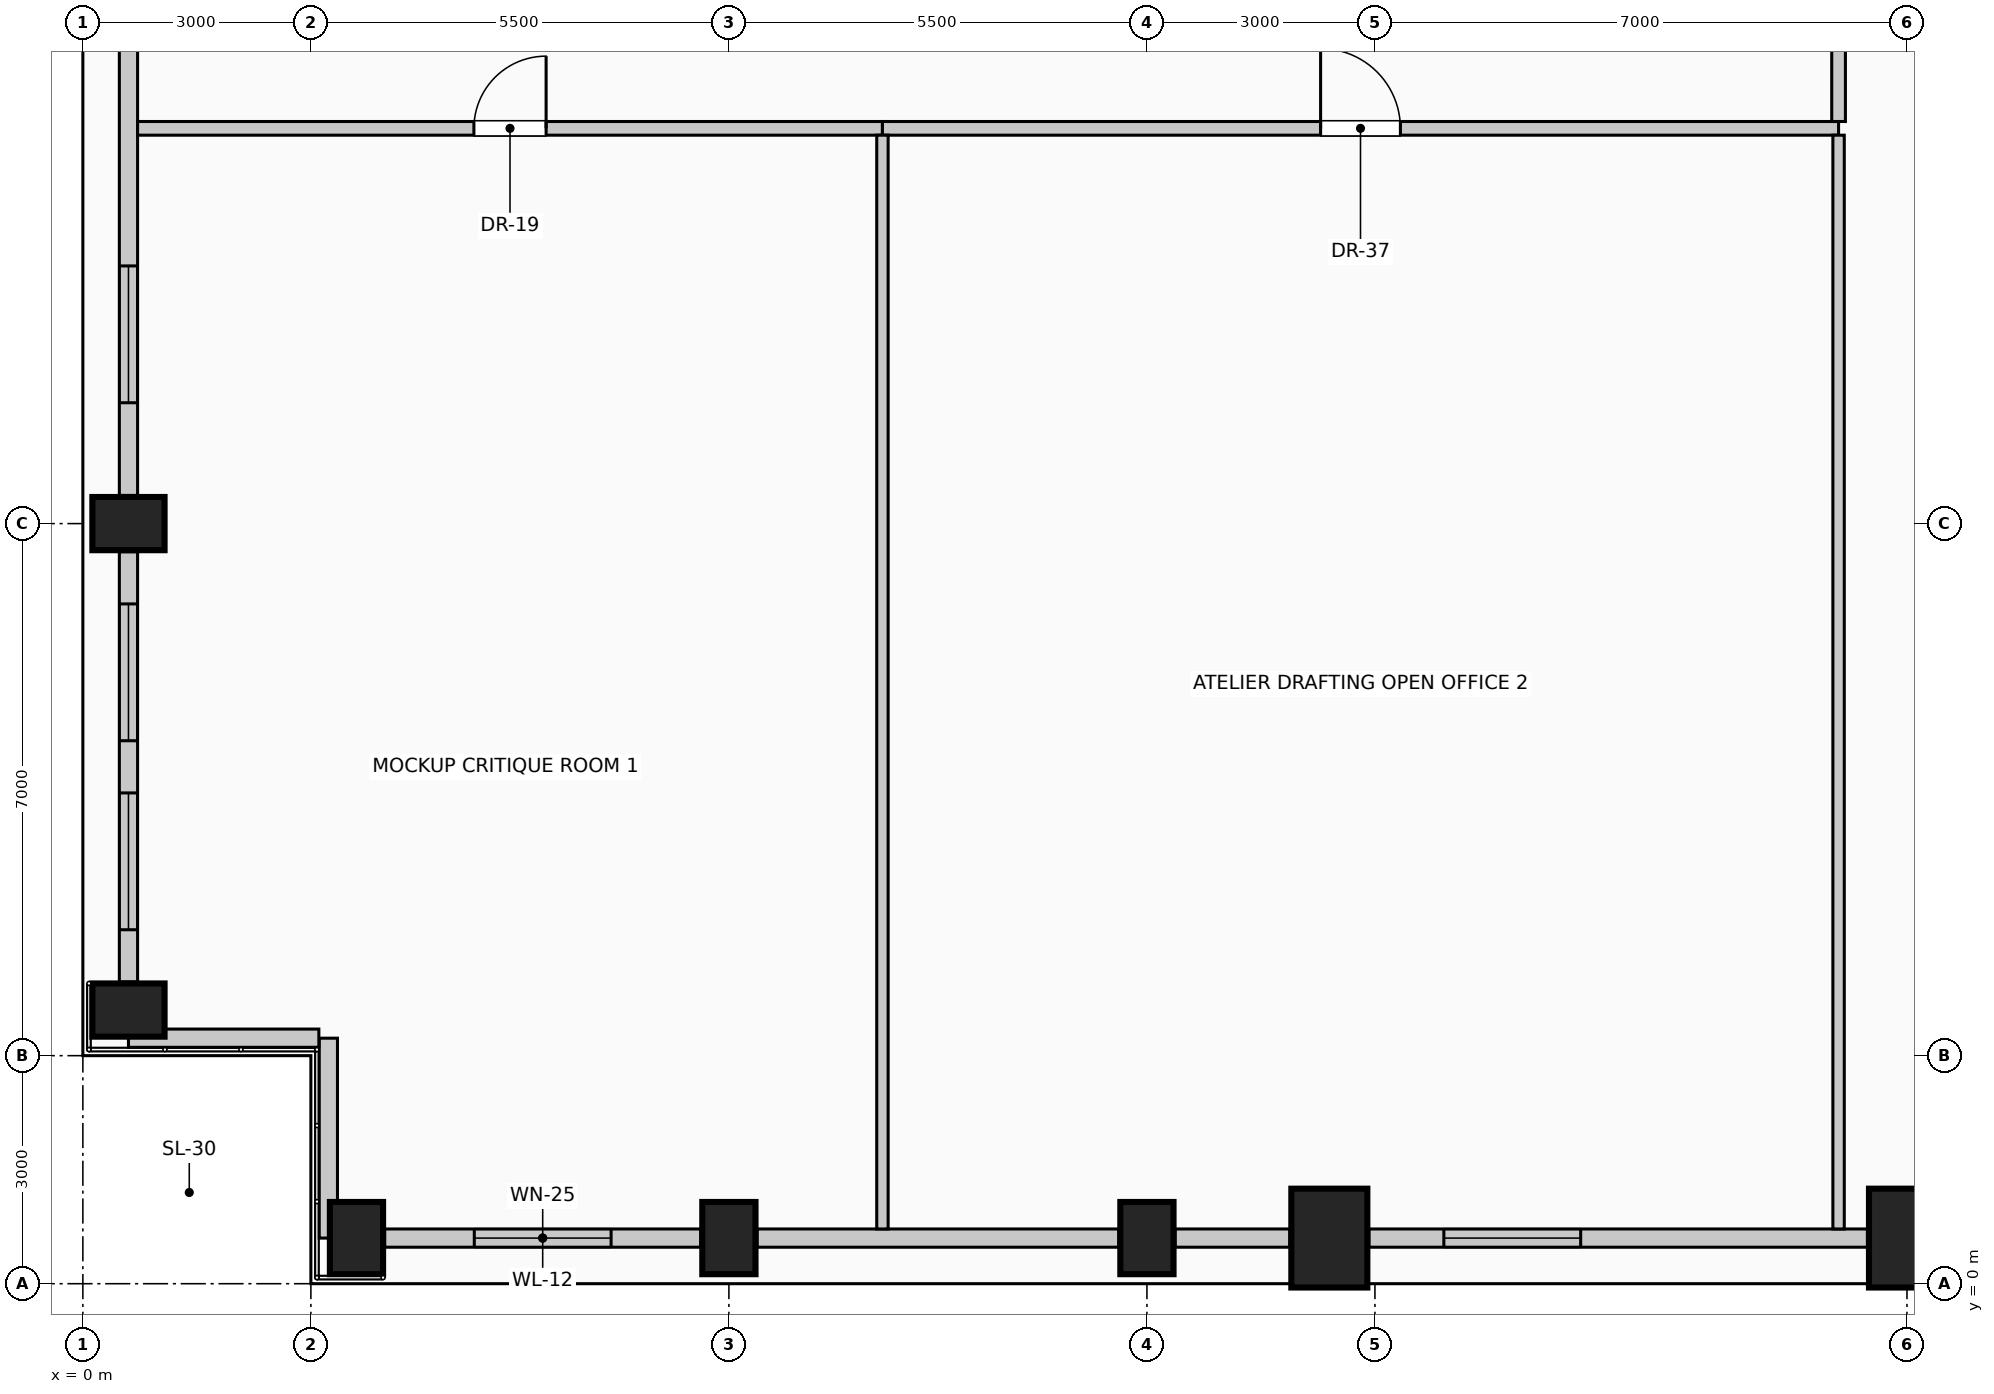
"""IFC4 building model, lengths in metres.
Left out: names, types, materials, properties, quantities, classifications, styles, units other than length and angle.
Written with IfcOpenShell. Run it as: python <this file> out.ifc"""

import sys

from ifc_helpers import new_model, si_unit, direction, frame, frame_2d, origin, origin_2d, place, context, subcontext, project, spatial, rectangle, extrude, element, fill, save


model = new_model("IFC4")
c1 = context("Model", 3, precision=1e-05, world=origin(), true_north=direction((0.0, 1.0)))
c2 = subcontext(c1, "Body", "Model", "MODEL_VIEW")
j1 = project(units=[si_unit("LENGTHUNIT", "METRE"), si_unit("PLANEANGLEUNIT", "RADIAN")], contexts=[c1])
p1 = place(None, origin())
s1 = spatial("IfcSite", under=j1, at=p1, CompositionType="ELEMENT")
p2 = place(p1, origin())
s2 = spatial("IfcBuilding", under=s1, at=p2, CompositionType="ELEMENT")
p3 = place(p2, frame((0.0, 0.0, 272.6)))
s3 = spatial("IfcBuildingStorey", under=s2, at=p3, CompositionType="ELEMENT", Elevation=272.6)
for number, where, z_axis, x_axis in (
    (1, (3.6, 0.6, 0.0), (0.0, 0.0, 1.0), (1.0, 0.0, 0.0)),
    (2, (8.5, 0.6, 0.0), (0.0, 0.0, 1.0), (1.0, 0.0, 0.0)),
    (3, (14.0, 0.6, 0.0), (0.0, 0.0, 1.0), (1.0, 0.0, 0.0)),
):
    element("IfcColumn", number, at=place(p3, frame(where, z_axis=z_axis, x_axis=x_axis)), inside=s3, PredefinedType="COLUMN", context=c2, shape_type="SweptSolid", body=[
        extrude(rectangle(XDim=0.7, YDim=0.95, at=origin_2d()), origin(), (0.0, 0.0, 1.0), 4.0),
    ])
for number, where, z_axis, x_axis in (
    (4, (16.4, 0.6, 0.0), (0.0, 0.0, 1.0), (1.0, 0.0, 0.0)),
    (5, (24.0, 0.6, 0.0), (0.0, 0.0, 1.0), (1.0, 0.0, 0.0)),
):
    element("IfcColumn", number, at=place(p3, frame(where, z_axis=z_axis, x_axis=x_axis)), inside=s3, PredefinedType="COLUMN", context=c2, shape_type="SweptSolid", body=[
        extrude(rectangle(XDim=1.0, YDim=1.3, at=origin_2d()), origin(), (0.0, 0.0, 1.0), 4.0),
    ])
for number, where, z_axis, x_axis in (
    (6, (0.6, 3.6, 0.0), (0.0, 0.0, 1.0), (0.0, 1.0, 0.0)),
    (7, (0.6, 10.0, 0.0), (0.0, 0.0, 1.0), (0.0, 1.0, 0.0)),
):
    element("IfcColumn", number, at=place(p3, frame(where, z_axis=z_axis, x_axis=x_axis)), inside=s3, PredefinedType="COLUMN", context=c2, shape_type="SweptSolid", body=[
        extrude(rectangle(XDim=0.7, YDim=0.95, at=origin_2d()), origin(), (0.0, 0.0, 1.0), 4.0),
    ])
p4 = place(p3, frame((8.13, 0.6, 0.0), z_axis=(0.0, 0.0, 1.0), x_axis=(-1.0, 0.0, 0.0)))
e8 = element("IfcWall", 8, at=p4, inside=s3, PredefinedType="SOLIDWALL", context=c2, shape_type="SweptSolid", body=[
    extrude(rectangle(XDim=4.16, YDim=0.24, at=frame_2d((2.08, 0.0))), origin(), (0.0, 0.0, 1.0), 3.0),
])
p5 = place(p4, frame((1.18, 0.0, 0.42)))
e9 = element("IfcOpeningElement", 9, at=p5, cuts=e8, PredefinedType="OPENING", context=c2, shape_type="SweptSolid", body=[
    extrude(rectangle(XDim=1.8, YDim=2.2, at=frame_2d((0.9, 1.1))), frame((0.0, 0.13, 0.0), z_axis=(0.0, -1.0, 0.0), x_axis=(1.0, 0.0, 0.0)), (0.0, 0.0, 1.0), 0.26),
])
p6 = place(p3, frame((13.63, 0.6, 0.0), z_axis=(0.0, 0.0, 1.0), x_axis=(-1.0, 0.0, 0.0)))
e10 = element("IfcWall", 10, at=p6, inside=s3, PredefinedType="SOLIDWALL", context=c2, shape_type="SweptSolid", body=[
    extrude(rectangle(XDim=4.76, YDim=0.24, at=frame_2d((2.38, 0.0))), origin(), (0.0, 0.0, 1.0), 3.0),
])
p7 = place(p3, frame((15.88, 0.6, 0.0), z_axis=(0.0, 0.0, 1.0), x_axis=(-1.0, 0.0, 0.0)))
e11 = element("IfcWall", 11, at=p7, inside=s3, PredefinedType="SOLIDWALL", context=c2, shape_type="SweptSolid", body=[
    extrude(rectangle(XDim=1.51, YDim=0.24, at=frame_2d((0.755, 0.0))), origin(), (0.0, 0.0, 1.0), 3.0),
])
p8 = place(p3, frame((23.48, 0.6, 0.0), z_axis=(0.0, 0.0, 1.0), x_axis=(-1.0, 0.0, 0.0)))
e12 = element("IfcWall", 12, at=p8, inside=s3, PredefinedType="SOLIDWALL", context=c2, shape_type="SweptSolid", body=[
    extrude(rectangle(XDim=6.56, YDim=0.24, at=frame_2d((3.28, 0.0))), origin(), (0.0, 0.0, 1.0), 3.0),
])
p9 = place(p8, frame((3.773, 0.0, 0.42)))
e13 = element("IfcOpeningElement", 13, at=p9, cuts=e12, PredefinedType="OPENING", context=c2, shape_type="SweptSolid", body=[
    extrude(rectangle(XDim=1.8, YDim=2.2, at=frame_2d((0.9, 1.1))), frame((0.0, 0.13, 0.0), z_axis=(0.0, -1.0, 0.0), x_axis=(1.0, 0.0, 0.0)), (0.0, 0.0, 1.0), 0.26),
])
p10 = place(p3, frame((0.6, 3.97, 0.0), z_axis=(0.0, 0.0, 1.0), x_axis=(0.0, 1.0, 0.0)))
e14 = element("IfcWall", 14, at=p10, inside=s3, PredefinedType="SOLIDWALL", context=c2, shape_type="SweptSolid", body=[
    extrude(rectangle(XDim=5.66, YDim=0.24, at=frame_2d((2.83, 0.0))), origin(), (0.0, 0.0, 1.0), 3.0),
])
p11 = place(p10, frame((0.687, 0.0, 0.42)))
e15 = element("IfcOpeningElement", 15, at=p11, cuts=e14, PredefinedType="OPENING", context=c2, shape_type="SweptSolid", body=[
    extrude(rectangle(XDim=1.8, YDim=2.2, at=frame_2d((0.9, 1.1))), frame((0.0, 0.13, 0.0), z_axis=(0.0, -1.0, 0.0), x_axis=(1.0, 0.0, 0.0)), (0.0, 0.0, 1.0), 0.26),
])
p12 = place(p10, frame((3.173, 0.0, 0.42)))
e16 = element("IfcOpeningElement", 16, at=p12, cuts=e14, PredefinedType="OPENING", context=c2, shape_type="SweptSolid", body=[
    extrude(rectangle(XDim=1.8, YDim=2.2, at=frame_2d((0.9, 1.1))), frame((0.0, 0.13, 0.0), z_axis=(0.0, -1.0, 0.0), x_axis=(1.0, 0.0, 0.0)), (0.0, 0.0, 1.0), 0.26),
])
p13 = place(p3, frame((0.6, 10.37, 0.0), z_axis=(0.0, 0.0, 1.0), x_axis=(0.0, 1.0, 0.0)))
e17 = element("IfcWall", 17, at=p13, inside=s3, PredefinedType="SOLIDWALL", context=c2, shape_type="SweptSolid", body=[
    extrude(rectangle(XDim=7.26, YDim=0.24, at=frame_2d((3.63, 0.0))), origin(), (0.0, 0.0, 1.0), 3.0),
])
p14 = place(p13, frame((1.22, 0.0, 0.42)))
e18 = element("IfcOpeningElement", 18, at=p14, cuts=e17, PredefinedType="OPENING", context=c2, shape_type="SweptSolid", body=[
    extrude(rectangle(XDim=1.8, YDim=2.2, at=frame_2d((0.9, 1.1))), frame((0.0, 0.13, 0.0), z_axis=(0.0, -1.0, 0.0), x_axis=(1.0, 0.0, 0.0)), (0.0, 0.0, 1.0), 0.26),
])
p15 = place(p3, frame((3.23, 0.6, 0.0), z_axis=(0.0, 0.0, 1.0), x_axis=(0.0, 1.0, 0.0)))
e19 = element("IfcWall", 19, at=p15, inside=s3, PredefinedType="SOLIDWALL", context=c2, shape_type="SweptSolid", body=[
    extrude(rectangle(XDim=2.63, YDim=0.24, at=frame_2d((1.315, 0.0))), origin(), (0.0, 0.0, 1.0), 3.75),
])
p16 = place(p3, frame((3.105, 3.23, 0.0), z_axis=(0.0, 0.0, 1.0), x_axis=(-1.0, 0.0, 0.0)))
e20 = element("IfcWall", 20, at=p16, inside=s3, PredefinedType="SOLIDWALL", context=c2, shape_type="SweptSolid", body=[
    extrude(rectangle(XDim=2.505, YDim=0.24, at=frame_2d((1.252, 0.0))), origin(), (0.0, 0.0, 1.0), 3.75),
])
p17 = place(p3, frame((0.72, 15.2, 0.0), z_axis=(0.0, 0.0, 1.0), x_axis=(1.0, 0.0, 0.0)))
e21 = element("IfcWall", 21, at=p17, inside=s3, PredefinedType="PARTITIONING", context=c2, shape_type="SweptSolid", body=[
    extrude(rectangle(XDim=9.8, YDim=0.18, at=frame_2d((4.9, 0.0))), origin(), (0.0, 0.0, 1.0), 3.75),
])
p18 = place(p17, frame((4.425, 0.0, 0.0)))
e22 = element("IfcOpeningElement", 22, at=p18, cuts=e21, PredefinedType="OPENING", context=c2, shape_type="SweptSolid", body=[
    extrude(rectangle(XDim=0.95, YDim=2.15, at=frame_2d((0.475, 1.075))), frame((0.0, 0.1, 0.0), z_axis=(0.0, -1.0, 0.0), x_axis=(1.0, 0.0, 0.0)), (0.0, 0.0, 1.0), 0.2),
])
p19 = place(p3, frame((10.52, 15.2, 0.0), z_axis=(0.0, 0.0, 1.0), x_axis=(1.0, 0.0, 0.0)))
e23 = element("IfcWall", 23, at=p19, inside=s3, PredefinedType="PARTITIONING", context=c2, shape_type="SweptSolid", body=[
    extrude(rectangle(XDim=12.58, YDim=0.18, at=frame_2d((6.29, 0.0))), origin(), (0.0, 0.0, 1.0), 3.75),
])
p20 = place(p19, frame((5.765, 0.0, 0.0)))
e24 = element("IfcOpeningElement", 24, at=p20, cuts=e23, PredefinedType="OPENING", context=c2, shape_type="SweptSolid", body=[
    extrude(rectangle(XDim=1.05, YDim=2.15, at=frame_2d((0.525, 1.075))), frame((0.0, 0.1, 0.0), z_axis=(0.0, -1.0, 0.0), x_axis=(1.0, 0.0, 0.0)), (0.0, 0.0, 1.0), 0.2),
])
for number, where, z_axis, x_axis in (
    (25, (10.52, 0.72, 0.0), (0.0, 0.0, 1.0), (0.0, 1.0, 0.0)),
    (26, (23.1, 0.72, 0.0), (0.0, 0.0, 1.0), (0.0, 1.0, 0.0)),
):
    element("IfcWall", number, at=place(p3, frame(where, z_axis=z_axis, x_axis=x_axis)), inside=s3, PredefinedType="PARTITIONING", context=c2, shape_type="SweptSolid", body=[
        extrude(rectangle(XDim=14.39, YDim=0.15, at=frame_2d((7.195, 0.0))), origin(), (0.0, 0.0, 1.0), 3.75),
    ])
p21 = place(p3, frame((23.1, 15.29, 0.0), z_axis=(0.0, 0.0, 1.0), x_axis=(0.0, 1.0, 0.0)))
e27 = element("IfcWall", 27, at=p21, inside=s3, PredefinedType="PARTITIONING", context=c2, shape_type="SweptSolid", body=[
    extrude(rectangle(XDim=2.01, YDim=0.18, at=frame_2d((1.005, 0.0))), origin(), (0.0, 0.0, 1.0), 3.75),
])
p22 = place(p5, origin())
e28 = element("IfcWindow", 28, at=p22, inside=s3, PartitioningType="SINGLE_PANEL", PredefinedType="WINDOW", context=c2, shape_type="SweptSolid", body=[
    extrude(rectangle(XDim=1.8, YDim=2.2, at=frame_2d((0.9, 1.1))), frame((0.0, 0.03, 0.0), z_axis=(0.0, -1.0, 0.0), x_axis=(1.0, 0.0, 0.0)), (0.0, 0.0, 1.0), 0.06),
])
fill(e9, e28)
p23 = place(p9, origin())
e29 = element("IfcWindow", 29, at=p23, inside=s3, PartitioningType="SINGLE_PANEL", PredefinedType="WINDOW", context=c2, shape_type="SweptSolid", body=[
    extrude(rectangle(XDim=1.8, YDim=2.2, at=frame_2d((0.9, 1.1))), frame((0.0, 0.03, 0.0), z_axis=(0.0, -1.0, 0.0), x_axis=(1.0, 0.0, 0.0)), (0.0, 0.0, 1.0), 0.06),
])
fill(e13, e29)
p24 = place(p11, origin())
e30 = element("IfcWindow", 30, at=p24, inside=s3, PartitioningType="SINGLE_PANEL", PredefinedType="WINDOW", context=c2, shape_type="SweptSolid", body=[
    extrude(rectangle(XDim=1.8, YDim=2.2, at=frame_2d((0.9, 1.1))), frame((0.0, 0.03, 0.0), z_axis=(0.0, -1.0, 0.0), x_axis=(1.0, 0.0, 0.0)), (0.0, 0.0, 1.0), 0.06),
])
fill(e15, e30)
p25 = place(p12, origin())
e31 = element("IfcWindow", 31, at=p25, inside=s3, PartitioningType="SINGLE_PANEL", PredefinedType="WINDOW", context=c2, shape_type="SweptSolid", body=[
    extrude(rectangle(XDim=1.8, YDim=2.2, at=frame_2d((0.9, 1.1))), frame((0.0, 0.03, 0.0), z_axis=(0.0, -1.0, 0.0), x_axis=(1.0, 0.0, 0.0)), (0.0, 0.0, 1.0), 0.06),
])
fill(e16, e31)
p26 = place(p14, origin())
e32 = element("IfcWindow", 32, at=p26, inside=s3, PartitioningType="SINGLE_PANEL", PredefinedType="WINDOW", context=c2, shape_type="SweptSolid", body=[
    extrude(rectangle(XDim=1.8, YDim=2.2, at=frame_2d((0.9, 1.1))), frame((0.0, 0.03, 0.0), z_axis=(0.0, -1.0, 0.0), x_axis=(1.0, 0.0, 0.0)), (0.0, 0.0, 1.0), 0.06),
])
fill(e18, e32)
p27 = place(p18, origin())
e33 = element("IfcDoor", 33, at=p27, inside=s3, OperationType="SINGLE_SWING_RIGHT", PredefinedType="DOOR", context=c2, shape_type="SweptSolid", body=[
    extrude(rectangle(XDim=0.95, YDim=2.15, at=frame_2d((0.475, 1.075))), frame((0.0, 0.025, 0.0), z_axis=(0.0, -1.0, 0.0), x_axis=(1.0, 0.0, 0.0)), (0.0, 0.0, 1.0), 0.05),
])
fill(e22, e33)
p28 = place(p20, origin())
e34 = element("IfcDoor", 34, at=p28, inside=s3, OperationType="SINGLE_SWING_LEFT", PredefinedType="DOOR", context=c2, shape_type="SweptSolid", body=[
    extrude(rectangle(XDim=1.05, YDim=2.15, at=frame_2d((0.525, 1.075))), frame((0.0, 0.025, 0.0), z_axis=(0.0, -1.0, 0.0), x_axis=(1.0, 0.0, 0.0)), (0.0, 0.0, 1.0), 0.05),
])
fill(e24, e34)
save(model, sys.argv[1])
